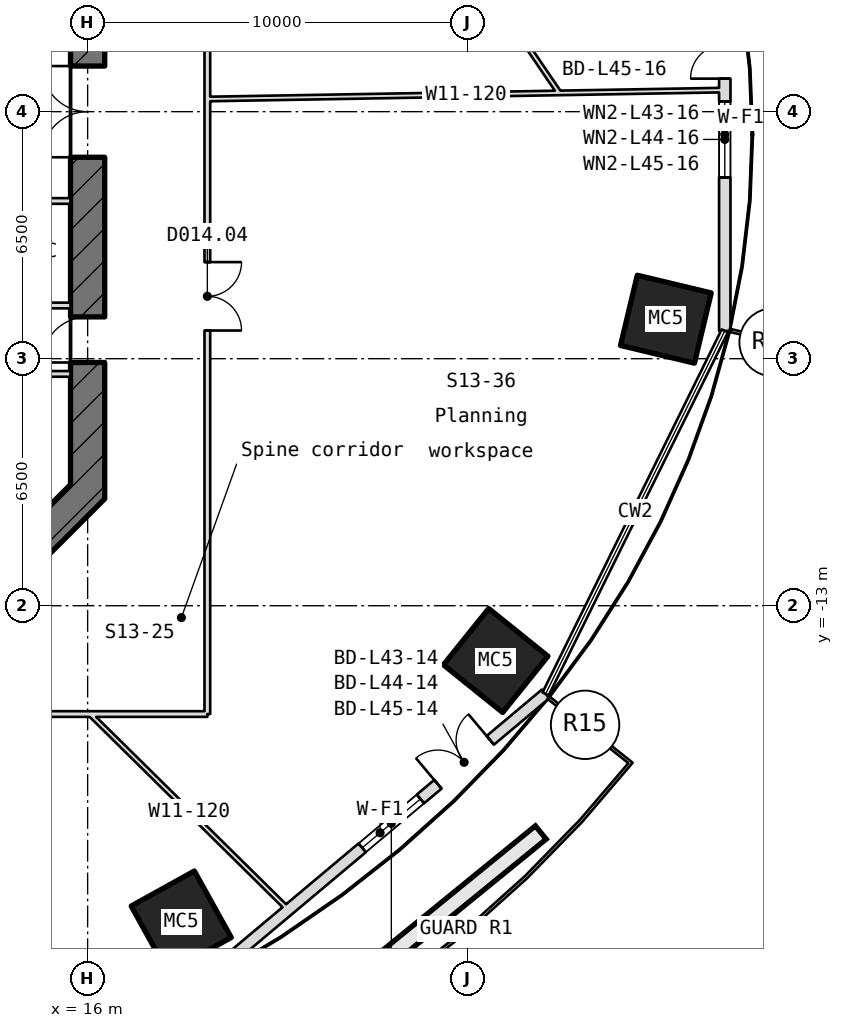
"""IFC4 building model, lengths in metres.
Left out: names, types, materials, properties, quantities, classifications, styles, units other than length and angle.
Written with IfcOpenShell. Run it as: python <this file> out.ifc"""

import sys

from ifc_helpers import new_model, si_unit, direction, frame, frame_2d, origin, origin_2d, place, context, subcontext, project, spatial, rectangle, hollow_rectangle, extrude, element, fill, save


model = new_model("IFC4")
c1 = context("Model", 3, precision=1e-05, world=origin(), true_north=direction((0.0, 1.0)))
c2 = subcontext(c1, "Body", "Model", "MODEL_VIEW")
j1 = project(units=[si_unit("LENGTHUNIT", "METRE"), si_unit("PLANEANGLEUNIT", "RADIAN")], contexts=[c1])
p1 = place(None, origin())
s1 = spatial("IfcSite", under=j1, at=p1, CompositionType="ELEMENT")
p2 = place(p1, origin())
s2 = spatial("IfcBuilding", under=s1, at=p2, CompositionType="ELEMENT")
p3 = place(p2, frame((0.0, 0.0, 198.4)))
s3 = spatial("IfcBuildingStorey", under=s2, at=p3, CompositionType="ELEMENT", Elevation=198.4)
for number, where, z_axis, x_axis in (
    (1, (18.463, -21.316, -0.18), (0.0, 0.0, 1.0), (-0.874, -0.485, 0.0)),
    (2, (26.737, -14.442, -0.18), (0.0, 0.0, 1.0), (-0.627, -0.779, 0.0)),
    (3, (31.216, -5.461, -0.18), (0.0, 0.0, 1.0), (-0.233, -0.973, 0.0)),
):
    element("IfcColumn", number, at=place(p3, frame(where, z_axis=z_axis, x_axis=x_axis)), inside=s3, PredefinedType="COLUMN", context=c2, shape_type="SweptSolid", body=[
        extrude(hollow_rectangle(XDim=1.9, YDim=2.0, WallThickness=0.07, at=origin_2d()), origin(), (0.0, 0.0, 1.0), 4.15),
    ])
p4 = place(p3, frame((19.341, -22.63, 0.0), z_axis=(0.0, 0.0, 1.0), x_axis=(0.766004647457, 0.642835033329, 0.0)))
e4 = element("IfcWall", 4, at=p4, inside=s3, PredefinedType="SOLIDWALL", context=c2, shape_type="SweptSolid", body=[
    extrude(rectangle(XDim=11.372, YDim=0.3, at=frame_2d((5.686, 0.0))), origin(), (0.0, 0.0, 1.0), 3.97),
])
p5 = place(p4, frame((7.672, 0.0, 0.0)))
e5 = element("IfcOpeningElement", 5, at=p5, cuts=e4, PredefinedType="OPENING", context=c2, shape_type="SweptSolid", body=[
    extrude(rectangle(XDim=1.8, YDim=2.4, at=frame_2d((0.9, 1.2))), frame((0.0, 0.16, 0.0), z_axis=(0.0, -1.0, 0.0), x_axis=(1.0, 0.0, 0.0)), (0.0, 0.0, 1.0), 0.32),
])
p6 = place(p4, frame((5.072, 0.0, 0.9)))
e6 = element("IfcOpeningElement", 6, at=p6, cuts=e4, PredefinedType="OPENING", context=c2, shape_type="SweptSolid", body=[
    extrude(rectangle(XDim=2.0, YDim=1.5, at=frame_2d((1.0, 0.75))), frame((0.0, 0.16, 0.0), z_axis=(0.0, -1.0, 0.0), x_axis=(1.0, 0.0, 0.0)), (0.0, 0.0, 1.0), 0.32),
])
p7 = place(p3, frame((32.765, -5.769, 0.0), z_axis=(0.0, 0.0, 1.0), x_axis=(0.0, 1.0, 0.0)))
e7 = element("IfcWall", 7, at=p7, inside=s3, PredefinedType="SOLIDWALL", context=c2, shape_type="SweptSolid", body=[
    extrude(rectangle(XDim=10.338, YDim=0.3, at=frame_2d((5.169, 0.0))), origin(), (0.0, 0.0, 1.0), 3.97),
])
p8 = place(p7, frame((6.638, 0.0, 0.0)))
e8 = element("IfcOpeningElement", 8, at=p8, cuts=e7, PredefinedType="OPENING", context=c2, shape_type="SweptSolid", body=[
    extrude(rectangle(XDim=1.8, YDim=2.4, at=frame_2d((0.9, 1.2))), frame((0.0, 0.16, 0.0), z_axis=(0.0, -1.0, 0.0), x_axis=(1.0, 0.0, 0.0)), (0.0, 0.0, 1.0), 0.32),
])
p9 = place(p7, frame((4.038, 0.0, 0.9)))
e9 = element("IfcOpeningElement", 9, at=p9, cuts=e7, PredefinedType="OPENING", context=c2, shape_type="SweptSolid", body=[
    extrude(rectangle(XDim=2.0, YDim=1.5, at=frame_2d((1.0, 0.75))), frame((0.0, 0.16, 0.0), z_axis=(0.0, -1.0, 0.0), x_axis=(1.0, 0.0, 0.0)), (0.0, 0.0, 1.0), 0.32),
])
p10 = place(p3, frame((12.868, -13.132, -0.18), z_axis=(0.0, 0.0, 1.0), x_axis=(0.707106781187, 0.707106781187, 0.0)))
e10 = element("IfcWall", 10, at=p10, inside=s3, PredefinedType="SHEAR", context=c2, shape_type="SweptSolid", body=[
    extrude(rectangle(XDim=4.615, YDim=0.9, at=frame_2d((2.308, 0.0))), origin(), (0.0, 0.0, 1.0), 4.15),
])
p11 = place(p3, frame((16.0, -10.186, -0.18), z_axis=(0.0, 0.0, 1.0), x_axis=(0.0, 1.0, 0.0)))
e11 = element("IfcWall", 11, at=p11, inside=s3, PredefinedType="SHEAR", context=c2, shape_type="SweptSolid", body=[
    extrude(rectangle(XDim=20.373, YDim=0.9, at=frame_2d((10.186, 0.0))), origin(), (0.0, 0.0, 1.0), 4.15),
])
p12 = place(p11, frame((8.986, 0.0, 0.18)))
e12 = element("IfcOpeningElement", 12, at=p12, cuts=e11, PredefinedType="OPENING", context=c2, shape_type="SweptSolid", body=[
    extrude(rectangle(XDim=2.4, YDim=2.1, at=frame_2d((1.2, 1.05))), frame((0.0, 0.46, 0.0), z_axis=(0.0, -1.0, 0.0), x_axis=(1.0, 0.0, 0.0)), (0.0, 0.0, 1.0), 0.92),
])
p13 = place(p11, frame((13.586, 0.0, 0.18)))
e13 = element("IfcOpeningElement", 13, at=p13, cuts=e11, PredefinedType="OPENING", context=c2, shape_type="SweptSolid", body=[
    extrude(rectangle(XDim=1.2, YDim=2.1, at=frame_2d((0.6, 1.05))), frame((0.0, 0.46, 0.0), z_axis=(0.0, -1.0, 0.0), x_axis=(1.0, 0.0, 0.0)), (0.0, 0.0, 1.0), 0.92),
])
p14 = place(p11, frame((3.586, 0.0, 0.18)))
e14 = element("IfcOpeningElement", 14, at=p14, cuts=e11, PredefinedType="OPENING", context=c2, shape_type="SweptSolid", body=[
    extrude(rectangle(XDim=1.2, YDim=2.1, at=frame_2d((0.6, 1.05))), frame((0.0, 0.46, 0.0), z_axis=(0.0, -1.0, 0.0), x_axis=(1.0, 0.0, 0.0)), (0.0, 0.0, 1.0), 0.92),
])
p15 = place(p3, frame((8.55, -6.9, 0.0), z_axis=(0.0, 0.0, 1.0), x_axis=(1.0, 0.0, 0.0)))
e15 = element("IfcWall", 15, at=p15, inside=s3, PredefinedType="PARTITIONING", context=c2, shape_type="SweptSolid", body=[
    extrude(rectangle(XDim=7.0, YDim=0.15, at=frame_2d((3.5, 0.0))), origin(), (0.0, 0.0, 1.0), 3.97),
])
p16 = place(p15, frame((2.925, 0.0, 0.0)))
e16 = element("IfcOpeningElement", 16, at=p16, cuts=e15, PredefinedType="OPENING", context=c2, shape_type="SweptSolid", body=[
    extrude(rectangle(XDim=1.0, YDim=2.1, at=frame_2d((0.5, 1.05))), frame((0.0, 0.085, 0.0), z_axis=(0.0, -1.0, 0.0), x_axis=(1.0, 0.0, 0.0)), (0.0, 0.0, 1.0), 0.17),
])
p17 = place(p3, frame((8.55, -5.1, 0.0), z_axis=(0.0, 0.0, 1.0), x_axis=(1.0, 0.0, 0.0)))
e17 = element("IfcWall", 17, at=p17, inside=s3, PredefinedType="PARTITIONING", context=c2, shape_type="SweptSolid", body=[
    extrude(rectangle(XDim=7.0, YDim=0.15, at=frame_2d((3.5, 0.0))), origin(), (0.0, 0.0, 1.0), 3.97),
])
p18 = place(p17, frame((2.925, 0.0, 0.0)))
e18 = element("IfcOpeningElement", 18, at=p18, cuts=e17, PredefinedType="OPENING", context=c2, shape_type="SweptSolid", body=[
    extrude(rectangle(XDim=1.0, YDim=2.1, at=frame_2d((0.5, 1.05))), frame((0.0, 0.085, 0.0), z_axis=(0.0, -1.0, 0.0), x_axis=(1.0, 0.0, 0.0)), (0.0, 0.0, 1.0), 0.17),
])
p19 = place(p3, frame((8.4, -2.35, 0.0), z_axis=(0.0, 0.0, 1.0), x_axis=(1.0, 0.0, 0.0)))
e19 = element("IfcWall", 19, at=p19, inside=s3, PredefinedType="PARTITIONING", context=c2, shape_type="SweptSolid", body=[
    extrude(rectangle(XDim=7.15, YDim=0.15, at=frame_2d((3.575, 0.0))), origin(), (0.0, 0.0, 1.0), 3.97),
])
p20 = place(p3, frame((16.064, -15.85, 0.0), z_axis=(0.0, 0.0, 1.0), x_axis=(0.71183576694, -0.702345955284, 0.0)))
e20 = element("IfcWall", 20, at=p20, inside=s3, PredefinedType="PARTITIONING", context=c2, shape_type="SweptSolid", body=[
    extrude(rectangle(XDim=7.332, YDim=0.12, at=frame_2d((3.666, 0.0))), origin(), (0.0, 0.0, 1.0), 3.97),
])
p21 = place(p3, frame((19.15, -15.85, 0.0), z_axis=(0.0, 0.0, 1.0), x_axis=(-1.0, 0.0, 0.0)))
e21 = element("IfcWall", 21, at=p21, inside=s3, PredefinedType="PARTITIONING", context=c2, shape_type="SweptSolid", body=[
    extrude(rectangle(XDim=38.3, YDim=0.15, at=frame_2d((19.15, 0.0))), origin(), (0.0, 0.0, 1.0), 3.97),
])
p22 = place(p21, frame((30.386, 0.0, 0.0)))
e22 = element("IfcOpeningElement", 22, at=p22, cuts=e21, PredefinedType="OPENING", context=c2, shape_type="SweptSolid", body=[
    extrude(rectangle(XDim=1.8, YDim=2.1, at=frame_2d((0.9, 1.05))), frame((0.0, 0.085, 0.0), z_axis=(0.0, -1.0, 0.0), x_axis=(1.0, 0.0, 0.0)), (0.0, 0.0, 1.0), 0.17),
])
p23 = place(p21, frame((21.864, 0.0, 0.0)))
e23 = element("IfcOpeningElement", 23, at=p23, cuts=e21, PredefinedType="OPENING", context=c2, shape_type="SweptSolid", body=[
    extrude(rectangle(XDim=0.95, YDim=2.1, at=frame_2d((0.475, 1.05))), frame((0.0, 0.085, 0.0), z_axis=(0.0, -1.0, 0.0), x_axis=(1.0, 0.0, 0.0)), (0.0, 0.0, 1.0), 0.17),
])
p24 = place(p21, frame((17.904, 0.0, 0.0)))
e24 = element("IfcOpeningElement", 24, at=p24, cuts=e21, PredefinedType="OPENING", context=c2, shape_type="SweptSolid", body=[
    extrude(rectangle(XDim=0.95, YDim=2.1, at=frame_2d((0.475, 1.05))), frame((0.0, 0.085, 0.0), z_axis=(0.0, -1.0, 0.0), x_axis=(1.0, 0.0, 0.0)), (0.0, 0.0, 1.0), 0.17),
])
p25 = place(p21, frame((13.741, 0.0, 0.0)))
e25 = element("IfcOpeningElement", 25, at=p25, cuts=e21, PredefinedType="OPENING", context=c2, shape_type="SweptSolid", body=[
    extrude(rectangle(XDim=0.95, YDim=2.1, at=frame_2d((0.475, 1.05))), frame((0.0, 0.085, 0.0), z_axis=(0.0, -1.0, 0.0), x_axis=(1.0, 0.0, 0.0)), (0.0, 0.0, 1.0), 0.17),
])
p26 = place(p21, frame((9.359, 0.0, 0.0)))
e26 = element("IfcOpeningElement", 26, at=p26, cuts=e21, PredefinedType="OPENING", context=c2, shape_type="SweptSolid", body=[
    extrude(rectangle(XDim=0.95, YDim=2.1, at=frame_2d((0.475, 1.05))), frame((0.0, 0.085, 0.0), z_axis=(0.0, -1.0, 0.0), x_axis=(1.0, 0.0, 0.0)), (0.0, 0.0, 1.0), 0.17),
])
p27 = place(p21, frame((4.861, 0.0, 0.0)))
e27 = element("IfcOpeningElement", 27, at=p27, cuts=e21, PredefinedType="OPENING", context=c2, shape_type="SweptSolid", body=[
    extrude(rectangle(XDim=0.95, YDim=2.1, at=frame_2d((0.475, 1.05))), frame((0.0, 0.085, 0.0), z_axis=(0.0, -1.0, 0.0), x_axis=(1.0, 0.0, 0.0)), (0.0, 0.0, 1.0), 0.17),
])
p28 = place(p3, frame((19.15, 0.333, 0.0), z_axis=(0.0, 0.0, 1.0), x_axis=(0.999849395868, 0.01735469912, 0.0)))
e28 = element("IfcWall", 28, at=p28, inside=s3, PredefinedType="PARTITIONING", context=c2, shape_type="SweptSolid", body=[
    extrude(rectangle(XDim=13.617, YDim=0.12, at=frame_2d((6.809, 0.0))), origin(), (0.0, 0.0, 1.0), 3.97),
])
p29 = place(p3, frame((19.15, 14.301, 0.0), z_axis=(0.0, 0.0, 1.0), x_axis=(0.0, -1.0, 0.0)))
e29 = element("IfcWall", 29, at=p29, inside=s3, PredefinedType="PARTITIONING", context=c2, shape_type="SweptSolid", body=[
    extrude(rectangle(XDim=30.151, YDim=0.15, at=frame_2d((15.076, 0.0))), origin(), (0.0, 0.0, 1.0), 3.97),
])
p30 = place(p29, frame((8.921, 0.0, 0.0)))
e30 = element("IfcOpeningElement", 30, at=p30, cuts=e29, PredefinedType="OPENING", context=c2, shape_type="SweptSolid", body=[
    extrude(rectangle(XDim=0.95, YDim=2.1, at=frame_2d((0.475, 1.05))), frame((0.0, 0.085, 0.0), z_axis=(0.0, -1.0, 0.0), x_axis=(1.0, 0.0, 0.0)), (0.0, 0.0, 1.0), 0.17),
])
p31 = place(p29, frame((18.26, 0.0, 0.0)))
e31 = element("IfcOpeningElement", 31, at=p31, cuts=e29, PredefinedType="OPENING", context=c2, shape_type="SweptSolid", body=[
    extrude(rectangle(XDim=1.8, YDim=2.1, at=frame_2d((0.9, 1.05))), frame((0.0, 0.085, 0.0), z_axis=(0.0, -1.0, 0.0), x_axis=(1.0, 0.0, 0.0)), (0.0, 0.0, 1.0), 0.17),
])
p32 = place(p3, frame((28.408, 0.493, 0.0), z_axis=(0.0, 0.0, 1.0), x_axis=(-0.562606484452, 0.826724829464, 0.0)))
e32 = element("IfcWall", 32, at=p32, inside=s3, PredefinedType="PARTITIONING", context=c2, shape_type="SweptSolid", body=[
    extrude(rectangle(XDim=12.275, YDim=0.12, at=frame_2d((6.137, 0.0))), origin(), (0.0, 0.0, 1.0), 3.97),
])
p33 = place(p5, origin())
e33 = element("IfcDoor", 33, at=p33, inside=s3, OperationType="SINGLE_SWING_LEFT", PredefinedType="DOOR", context=c2, shape_type="SweptSolid", body=[
    extrude(rectangle(XDim=1.8, YDim=2.4, at=frame_2d((0.9, 1.2))), frame((0.0, 0.025, 0.0), z_axis=(0.0, -1.0, 0.0), x_axis=(1.0, 0.0, 0.0)), (0.0, 0.0, 1.0), 0.05),
])
fill(e5, e33)
p34 = place(p6, origin())
e34 = element("IfcWindow", 34, at=p34, inside=s3, PartitioningType="SINGLE_PANEL", PredefinedType="WINDOW", context=c2, shape_type="SweptSolid", body=[
    extrude(rectangle(XDim=2.0, YDim=1.5, at=frame_2d((1.0, 0.75))), frame((0.0, 0.03, 0.0), z_axis=(0.0, -1.0, 0.0), x_axis=(1.0, 0.0, 0.0)), (0.0, 0.0, 1.0), 0.06),
])
fill(e6, e34)
p35 = place(p8, origin())
e35 = element("IfcDoor", 35, at=p35, inside=s3, OperationType="SINGLE_SWING_LEFT", PredefinedType="DOOR", context=c2, shape_type="SweptSolid", body=[
    extrude(rectangle(XDim=1.8, YDim=2.4, at=frame_2d((0.9, 1.2))), frame((0.0, 0.025, 0.0), z_axis=(0.0, -1.0, 0.0), x_axis=(1.0, 0.0, 0.0)), (0.0, 0.0, 1.0), 0.05),
])
fill(e8, e35)
p36 = place(p9, origin())
e36 = element("IfcWindow", 36, at=p36, inside=s3, PartitioningType="SINGLE_PANEL", PredefinedType="WINDOW", context=c2, shape_type="SweptSolid", body=[
    extrude(rectangle(XDim=2.0, YDim=1.5, at=frame_2d((1.0, 0.75))), frame((0.0, 0.03, 0.0), z_axis=(0.0, -1.0, 0.0), x_axis=(1.0, 0.0, 0.0)), (0.0, 0.0, 1.0), 0.06),
])
fill(e9, e36)
p37 = place(p12, origin())
e37 = element("IfcDoor", 37, at=p37, inside=s3, OperationType="DOUBLE_DOOR_SINGLE_SWING", PredefinedType="DOOR", context=c2, shape_type="SweptSolid", body=[
    extrude(rectangle(XDim=2.4, YDim=2.1, at=frame_2d((1.2, 1.05))), frame((0.0, 0.025, 0.0), z_axis=(0.0, -1.0, 0.0), x_axis=(1.0, 0.0, 0.0)), (0.0, 0.0, 1.0), 0.05),
])
fill(e12, e37)
p38 = place(p14, origin())
e38 = element("IfcDoor", 38, at=p38, inside=s3, OperationType="SINGLE_SWING_RIGHT", PredefinedType="DOOR", context=c2, shape_type="SweptSolid", body=[
    extrude(rectangle(XDim=1.2, YDim=2.1, at=frame_2d((0.6, 1.05))), frame((0.0, 0.025, 0.0), z_axis=(0.0, -1.0, 0.0), x_axis=(1.0, 0.0, 0.0)), (0.0, 0.0, 1.0), 0.05),
])
fill(e14, e38)
p39 = place(p31, origin())
e39 = element("IfcDoor", 39, at=p39, inside=s3, OperationType="DOUBLE_DOOR_SINGLE_SWING", PredefinedType="DOOR", context=c2, shape_type="SweptSolid", body=[
    extrude(rectangle(XDim=1.8, YDim=2.1, at=frame_2d((0.9, 1.05))), frame((0.0, 0.025, 0.0), z_axis=(0.0, -1.0, 0.0), x_axis=(1.0, 0.0, 0.0)), (0.0, 0.0, 1.0), 0.05),
])
fill(e31, e39)
save(model, sys.argv[1])
